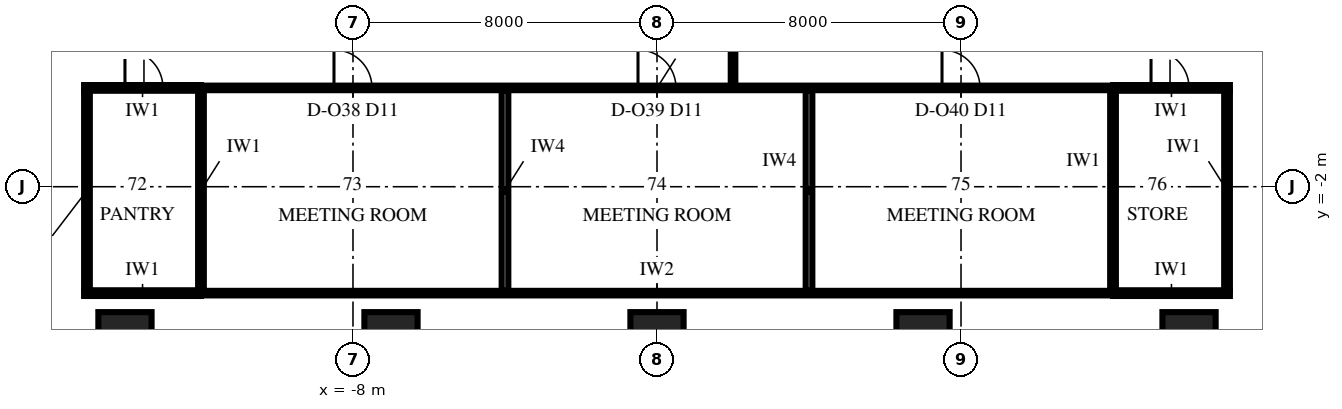
"""IFC4 building model, lengths in metres.
Left out: names, types, materials, properties, quantities, classifications, styles, units other than length and angle.
Written with IfcOpenShell. Run it as: python <this file> out.ifc"""

import sys

from ifc_helpers import new_model, si_unit, direction, frame, frame_2d, origin, origin_2d, place, context, subcontext, project, spatial, rectangle, extrude, element, fill, save


model = new_model("IFC4")
c1 = context("Model", 3, precision=1e-05, world=origin(), true_north=direction((0.0, 1.0)))
c2 = subcontext(c1, "Body", "Model", "MODEL_VIEW")
j1 = project(units=[si_unit("LENGTHUNIT", "METRE"), si_unit("PLANEANGLEUNIT", "RADIAN")], contexts=[c1])
p1 = place(None, origin())
s1 = spatial("IfcSite", under=j1, at=p1, CompositionType="ELEMENT")
p2 = place(p1, origin())
s2 = spatial("IfcBuilding", under=s1, at=p2, CompositionType="ELEMENT")
p3 = place(p2, frame((0.0, 0.0, 202.0)))
s3 = spatial("IfcBuildingStorey", under=s2, at=p3, CompositionType="ELEMENT", Elevation=202.0)
for number, where, z_axis, x_axis in (
    (1, (-14.0, -6.0, 0.0), (0.0, 0.0, 1.0), (1.0, 0.0, 0.0)),
    (2, (-7.0, -6.0, 0.0), (0.0, 0.0, 1.0), (1.0, 0.0, 0.0)),
    (3, (0.0, -6.0, 0.0), (0.0, 0.0, 1.0), (1.0, 0.0, 0.0)),
    (4, (7.0, -6.0, 0.0), (0.0, 0.0, 1.0), (1.0, 0.0, 0.0)),
    (5, (14.0, -6.0, 0.0), (0.0, 0.0, 1.0), (1.0, 0.0, 0.0)),
):
    element("IfcColumn", number, at=place(p3, frame(where, z_axis=z_axis, x_axis=x_axis)), inside=s3, PredefinedType="COLUMN", context=c2, shape_type="SweptSolid", body=[
        extrude(rectangle(XDim=1.4, YDim=1.4, at=origin_2d()), origin(), (0.0, 0.0, 1.0), 4.0),
    ])
p4 = place(p3, frame((-15.075, -4.8, 0.0), z_axis=(0.0, 0.0, 1.0), x_axis=(1.0, 0.0, 0.0)))
e6 = element("IfcWall", 6, at=p4, inside=s3, PredefinedType="PARTITIONING", context=c2, shape_type="SweptSolid", body=[
    extrude(rectangle(XDim=3.075, YDim=0.15, at=frame_2d((1.538, 0.0))), origin(), (0.0, 0.0, 1.0), 3.25),
])
p5 = place(p3, frame((-12.0, -4.8, 0.0), z_axis=(0.0, 0.0, 1.0), x_axis=(1.0, 0.0, 0.0)))
e7 = element("IfcWall", 7, at=p5, inside=s3, PredefinedType="PARTITIONING", context=c2, shape_type="SweptSolid", body=[
    extrude(rectangle(XDim=24.0, YDim=0.12, at=frame_2d((12.0, 0.0))), origin(), (0.0, 0.0, 1.0), 3.25),
])
p6 = place(p3, frame((12.0, -4.8, 0.0), z_axis=(0.0, 0.0, 1.0), x_axis=(1.0, 0.0, 0.0)))
e8 = element("IfcWall", 8, at=p6, inside=s3, PredefinedType="PARTITIONING", context=c2, shape_type="SweptSolid", body=[
    extrude(rectangle(XDim=3.075, YDim=0.15, at=frame_2d((1.538, 0.0))), origin(), (0.0, 0.0, 1.0), 3.25),
])
p7 = place(p3, frame((-15.075, 0.6, 0.0), z_axis=(0.0, 0.0, 1.0), x_axis=(1.0, 0.0, 0.0)))
e9 = element("IfcWall", 9, at=p7, inside=s3, PredefinedType="PARTITIONING", context=c2, shape_type="SweptSolid", body=[
    extrude(rectangle(XDim=3.075, YDim=0.15, at=frame_2d((1.538, 0.0))), origin(), (0.0, 0.0, 1.0), 3.25),
])
p8 = place(p7, frame((1.075, 0.0, 0.0)))
e10 = element("IfcOpeningElement", 10, at=p8, cuts=e9, PredefinedType="OPENING", context=c2, shape_type="SweptSolid", body=[
    extrude(rectangle(XDim=1.0, YDim=2.3, at=frame_2d((0.5, 1.15))), frame((0.0, 0.09, 0.0), z_axis=(0.0, -1.0, 0.0), x_axis=(1.0, 0.0, 0.0)), (0.0, 0.0, 1.0), 0.18),
])
p9 = place(p3, frame((-12.0, 0.6, 0.0), z_axis=(0.0, 0.0, 1.0), x_axis=(1.0, 0.0, 0.0)))
e11 = element("IfcWall", 11, at=p9, inside=s3, PredefinedType="PARTITIONING", context=c2, shape_type="SweptSolid", body=[
    extrude(rectangle(XDim=24.0, YDim=0.12, at=frame_2d((12.0, 0.0))), origin(), (0.0, 0.0, 1.0), 3.25),
])
p10 = place(p9, frame((3.5, 0.0, 0.0)))
e12 = element("IfcOpeningElement", 12, at=p10, cuts=e11, PredefinedType="OPENING", context=c2, shape_type="SweptSolid", body=[
    extrude(rectangle(XDim=1.0, YDim=2.4, at=frame_2d((0.5, 1.2))), frame((0.0, 0.075, 0.0), z_axis=(0.0, -1.0, 0.0), x_axis=(1.0, 0.0, 0.0)), (0.0, 0.0, 1.0), 0.15),
])
p11 = place(p9, frame((11.5, 0.0, 0.0)))
e13 = element("IfcOpeningElement", 13, at=p11, cuts=e11, PredefinedType="OPENING", context=c2, shape_type="SweptSolid", body=[
    extrude(rectangle(XDim=1.0, YDim=2.4, at=frame_2d((0.5, 1.2))), frame((0.0, 0.075, 0.0), z_axis=(0.0, -1.0, 0.0), x_axis=(1.0, 0.0, 0.0)), (0.0, 0.0, 1.0), 0.15),
])
p12 = place(p9, frame((19.5, 0.0, 0.0)))
e14 = element("IfcOpeningElement", 14, at=p12, cuts=e11, PredefinedType="OPENING", context=c2, shape_type="SweptSolid", body=[
    extrude(rectangle(XDim=1.0, YDim=2.4, at=frame_2d((0.5, 1.2))), frame((0.0, 0.075, 0.0), z_axis=(0.0, -1.0, 0.0), x_axis=(1.0, 0.0, 0.0)), (0.0, 0.0, 1.0), 0.15),
])
p13 = place(p3, frame((12.0, 0.6, 0.0), z_axis=(0.0, 0.0, 1.0), x_axis=(1.0, 0.0, 0.0)))
e15 = element("IfcWall", 15, at=p13, inside=s3, PredefinedType="PARTITIONING", context=c2, shape_type="SweptSolid", body=[
    extrude(rectangle(XDim=3.075, YDim=0.15, at=frame_2d((1.538, 0.0))), origin(), (0.0, 0.0, 1.0), 3.25),
])
p14 = place(p13, frame((1.0, 0.0, 0.0)))
e16 = element("IfcOpeningElement", 16, at=p14, cuts=e15, PredefinedType="OPENING", context=c2, shape_type="SweptSolid", body=[
    extrude(rectangle(XDim=1.0, YDim=2.3, at=frame_2d((0.5, 1.15))), frame((0.0, 0.09, 0.0), z_axis=(0.0, -1.0, 0.0), x_axis=(1.0, 0.0, 0.0)), (0.0, 0.0, 1.0), 0.18),
])
for number, where, z_axis, x_axis in (
    (17, (-15.0, -4.725, 0.0), (0.0, 0.0, 1.0), (0.0, 1.0, 0.0)),
    (18, (-12.0, -4.725, 0.0), (0.0, 0.0, 1.0), (0.0, 1.0, 0.0)),
):
    element("IfcWall", number, at=place(p3, frame(where, z_axis=z_axis, x_axis=x_axis)), inside=s3, PredefinedType="PARTITIONING", context=c2, shape_type="SweptSolid", body=[
        extrude(rectangle(XDim=5.25, YDim=0.15, at=frame_2d((2.625, 0.0))), origin(), (0.0, 0.0, 1.0), 3.85),
    ])
for number, where, z_axis, x_axis in (
    (19, (-4.0, -4.74, 0.0), (0.0, 0.0, 1.0), (0.0, 1.0, 0.0)),
    (20, (4.0, -4.74, 0.0), (0.0, 0.0, 1.0), (0.0, 1.0, 0.0)),
):
    element("IfcWall", number, at=place(p3, frame(where, z_axis=z_axis, x_axis=x_axis)), inside=s3, PredefinedType="PARTITIONING", context=c2, shape_type="SweptSolid", body=[
        extrude(rectangle(XDim=5.28, YDim=0.175, at=frame_2d((2.64, 0.0))), origin(), (0.0, 0.0, 1.0), 3.85),
    ])
for number, where, z_axis, x_axis in (
    (21, (12.0, -4.725, 0.0), (0.0, 0.0, 1.0), (0.0, 1.0, 0.0)),
    (22, (15.0, -4.725, 0.0), (0.0, 0.0, 1.0), (0.0, 1.0, 0.0)),
):
    element("IfcWall", number, at=place(p3, frame(where, z_axis=z_axis, x_axis=x_axis)), inside=s3, PredefinedType="PARTITIONING", context=c2, shape_type="SweptSolid", body=[
        extrude(rectangle(XDim=5.25, YDim=0.15, at=frame_2d((2.625, 0.0))), origin(), (0.0, 0.0, 1.0), 3.85),
    ])
p15 = place(p3, frame((2.001, 0.68, 0.0), z_axis=(0.0, 0.0, 1.0), x_axis=(0.0, 1.0, 0.0)))
e23 = element("IfcWall", 23, at=p15, inside=s3, PredefinedType="PARTITIONING", context=c2, shape_type="SweptSolid", body=[
    extrude(rectangle(XDim=5.17, YDim=0.12, at=frame_2d((2.585, 0.0))), origin(), (0.0, 0.0, 1.0), 3.85),
])
p16 = place(p10, origin())
e24 = element("IfcDoor", 24, at=p16, inside=s3, OperationType="SINGLE_SWING_RIGHT", PredefinedType="DOOR", context=c2, shape_type="SweptSolid", body=[
    extrude(rectangle(XDim=1.0, YDim=2.4, at=frame_2d((0.5, 1.2))), frame((0.0, 0.06, 0.0), z_axis=(0.0, -1.0, 0.0), x_axis=(1.0, 0.0, 0.0)), (0.0, 0.0, 1.0), 0.12),
])
fill(e12, e24)
p17 = place(p11, origin())
e25 = element("IfcDoor", 25, at=p17, inside=s3, OperationType="SINGLE_SWING_RIGHT", PredefinedType="DOOR", context=c2, shape_type="SweptSolid", body=[
    extrude(rectangle(XDim=1.0, YDim=2.4, at=frame_2d((0.5, 1.2))), frame((0.0, 0.06, 0.0), z_axis=(0.0, -1.0, 0.0), x_axis=(1.0, 0.0, 0.0)), (0.0, 0.0, 1.0), 0.12),
])
fill(e13, e25)
p18 = place(p12, origin())
e26 = element("IfcDoor", 26, at=p18, inside=s3, OperationType="SINGLE_SWING_RIGHT", PredefinedType="DOOR", context=c2, shape_type="SweptSolid", body=[
    extrude(rectangle(XDim=1.0, YDim=2.4, at=frame_2d((0.5, 1.2))), frame((0.0, 0.06, 0.0), z_axis=(0.0, -1.0, 0.0), x_axis=(1.0, 0.0, 0.0)), (0.0, 0.0, 1.0), 0.12),
])
fill(e14, e26)
p19 = place(p14, origin())
e27 = element("IfcDoor", 27, at=p19, inside=s3, OperationType="SINGLE_SWING_LEFT", PredefinedType="DOOR", context=c2, shape_type="SweptSolid", body=[
    extrude(rectangle(XDim=1.0, YDim=2.3, at=frame_2d((0.5, 1.15))), frame((0.0, 0.075, 0.0), z_axis=(0.0, -1.0, 0.0), x_axis=(1.0, 0.0, 0.0)), (0.0, 0.0, 1.0), 0.149),
])
fill(e16, e27)
p20 = place(p8, origin())
e28 = element("IfcDoor", 28, at=p20, inside=s3, OperationType="SINGLE_SWING_LEFT", PredefinedType="DOOR", context=c2, shape_type="SweptSolid", body=[
    extrude(rectangle(XDim=1.0, YDim=2.3, at=frame_2d((0.5, 1.15))), frame((0.0, 0.075, 0.0), z_axis=(0.0, -1.0, 0.0), x_axis=(1.0, 0.0, 0.0)), (0.0, 0.0, 1.0), 0.149),
])
fill(e10, e28)
save(model, sys.argv[1])
